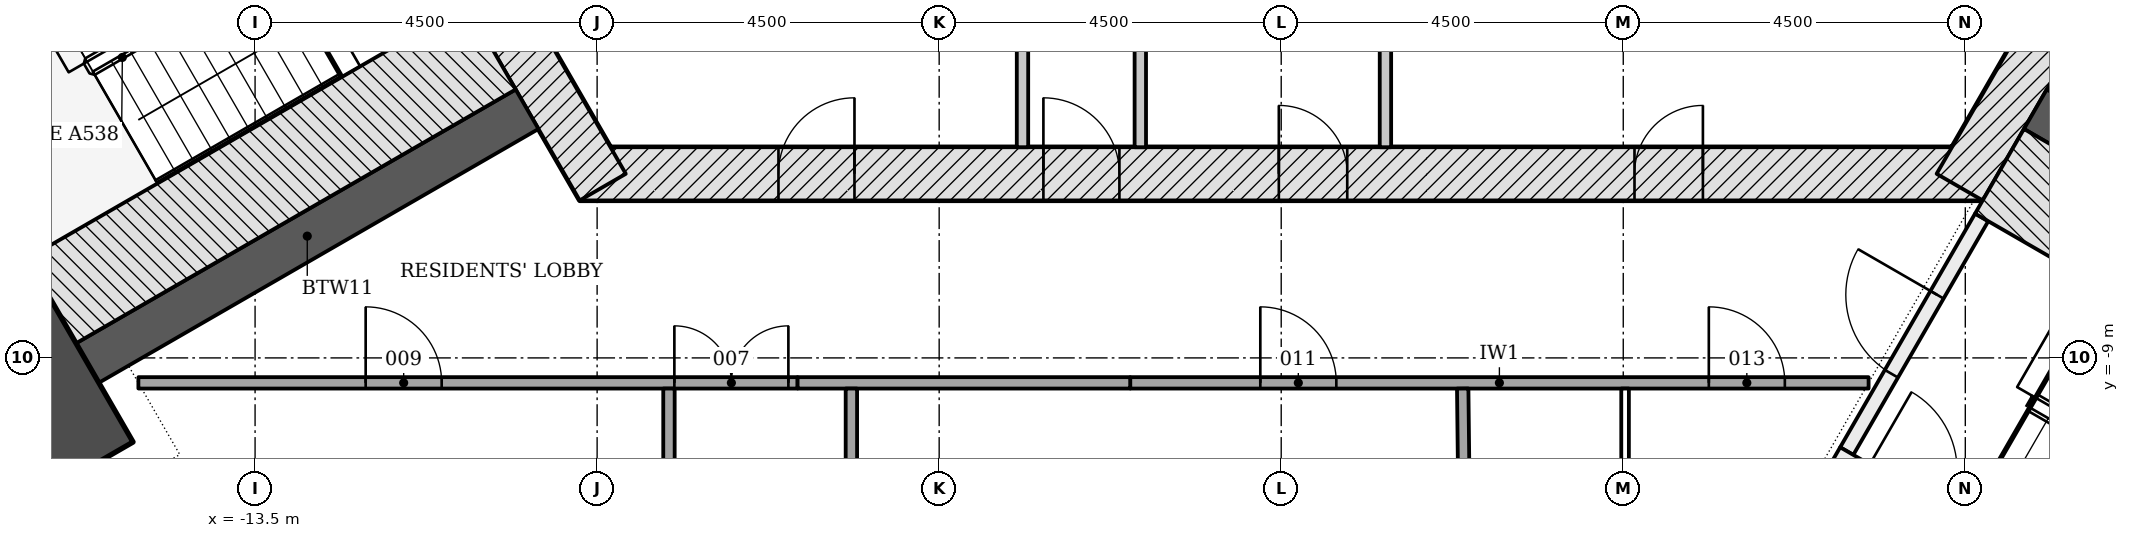
"""IFC4 building model, lengths in metres.
Left out: names, types, materials, properties, quantities, classifications, styles, units other than length and angle.
Written with IfcOpenShell. Run it as: python <this file> out.ifc"""

import sys

from ifc_helpers import new_model, si_unit, direction, frame, frame_2d, origin, origin_2d, place, context, subcontext, project, spatial, polyline, rectangle, outline, extrude, element, fill, save


model = new_model("IFC4")
c1 = context("Model", 3, precision=1e-05, world=origin(), true_north=direction((0.0, 1.0)))
c2 = subcontext(c1, "Body", "Model", "MODEL_VIEW")
j1 = project(units=[si_unit("LENGTHUNIT", "METRE"), si_unit("PLANEANGLEUNIT", "RADIAN")], contexts=[c1])
p1 = place(None, origin())
s1 = spatial("IfcSite", under=j1, at=p1, CompositionType="ELEMENT")
p2 = place(p1, origin())
s2 = spatial("IfcBuilding", under=s1, at=p2, CompositionType="ELEMENT")
p3 = place(p2, frame((0.0, 0.0, 263.4)))
s3 = spatial("IfcBuildingStorey", under=s2, at=p3, CompositionType="ELEMENT", Elevation=263.4)
p4 = place(p3, frame((-9.229, -6.578, -0.2), z_axis=(0.0, 0.0, 1.0), x_axis=(1.0, 0.0, 0.0)))
e1 = element("IfcWall", 1, at=p4, inside=s3, PredefinedType="SHEAR", context=c2, shape_type="SweptSolid", body=[
    extrude(rectangle(XDim=18.458, YDim=0.7, at=frame_2d((9.229, 0.0))), origin(), (0.0, 0.0, 1.0), 3.6),
])
p5 = place(p4, frame((6.1, 0.0, 0.2)))
e2 = element("IfcOpeningElement", 2, at=p5, cuts=e1, PredefinedType="OPENING", context=c2, shape_type="SweptSolid", body=[
    extrude(rectangle(XDim=1.0, YDim=2.1, at=frame_2d((0.5, 1.05))), frame((0.0, 0.36, 0.0), z_axis=(0.0, -1.0, 0.0), x_axis=(1.0, 0.0, 0.0)), (0.0, 0.0, 1.0), 0.72),
])
p6 = place(p4, frame((2.615, 0.0, 0.2)))
e3 = element("IfcOpeningElement", 3, at=p6, cuts=e1, PredefinedType="OPENING", context=c2, shape_type="SweptSolid", body=[
    extrude(rectangle(XDim=1.0, YDim=2.1, at=frame_2d((0.5, 1.05))), frame((0.0, 0.36, 0.0), z_axis=(0.0, -1.0, 0.0), x_axis=(1.0, 0.0, 0.0)), (0.0, 0.0, 1.0), 0.72),
])
p7 = place(p4, frame((9.198, 0.0, 0.2)))
e4 = element("IfcOpeningElement", 4, at=p7, cuts=e1, PredefinedType="OPENING", context=c2, shape_type="SweptSolid", body=[
    extrude(rectangle(XDim=0.9, YDim=2.1, at=frame_2d((0.45, 1.05))), frame((0.0, 0.36, 0.0), z_axis=(0.0, -1.0, 0.0), x_axis=(1.0, 0.0, 0.0)), (0.0, 0.0, 1.0), 0.72),
])
p8 = place(p4, frame((13.877, 0.0, 0.2)))
e5 = element("IfcOpeningElement", 5, at=p8, cuts=e1, PredefinedType="OPENING", context=c2, shape_type="SweptSolid", body=[
    extrude(rectangle(XDim=0.9, YDim=2.1, at=frame_2d((0.45, 1.05))), frame((0.0, 0.36, 0.0), z_axis=(0.0, -1.0, 0.0), x_axis=(1.0, 0.0, 0.0)), (0.0, 0.0, 1.0), 0.72),
])
for number, where, z_axis, x_axis in (
    (6, (8.926, -6.753, -0.2), (0.0, 0.0, 1.0), (0.5, 0.866, 0.0)),
    (7, (-10.311, -4.353, -0.2), (0.0, 0.0, 1.0), (0.5, -0.866, 0.0)),
):
    element("IfcWall", number, at=place(p3, frame(where, z_axis=z_axis, x_axis=x_axis)), inside=s3, PredefinedType="SHEAR", context=c2, shape_type="SweptSolid", body=[
        extrude(rectangle(XDim=2.771, YDim=0.7, at=frame_2d((1.386, 0.0))), origin(), (0.0, 0.0, 1.0), 3.6),
    ])
for number, where, z_axis, x_axis in (
    (8, (-9.922, -5.728, -0.2), (0.0, 0.0, 1.0), (-0.866, -0.5, 0.0)),
    (9, (9.922, -5.728, -0.2), (0.0, 0.0, 1.0), (0.866, -0.5, 0.0)),
):
    element("IfcWall", number, at=place(p3, frame(where, z_axis=z_axis, x_axis=x_axis)), inside=s3, PredefinedType="SHEAR", context=c2, shape_type="SweptSolid", body=[
        extrude(rectangle(XDim=6.678, YDim=0.6, at=frame_2d((3.339, 0.0))), origin(), (0.0, 0.0, 1.0), 3.6),
    ])
p9 = place(p3, frame((-16.745, -9.667, -0.2), z_axis=(0.0, 0.0, 1.0), x_axis=(-0.866025403784, -0.5, 0.0)))
e10 = element("IfcColumn", 10, at=p9, inside=s3, PredefinedType="COLUMN", context=c2, shape_type="SweptSolid", body=[
    extrude(rectangle(XDim=2.4, YDim=2.4, at=origin_2d()), origin(), (0.0, 0.0, 1.0), 3.6),
])
p10 = place(p3, origin())
e11 = element("IfcWall", 11, at=p10, inside=s3, PredefinedType="NOTDEFINED", context=c2, shape_type="SweptSolid", body=[
    extrude(outline(polyline([(-18.145, -2.507), (-19.021, -4.273), (-19.538, -5.703), (-19.733, -7.21), (-19.599, -8.724), (-19.141, -10.174), (-18.381, -11.49), (-17.355, -12.611), (-16.111, -13.485), (-14.708, -14.069), (-13.211, -14.336), (-11.244, -14.46), (-11.225, -14.161), (-13.176, -14.038), (-14.623, -13.779), (-15.965, -13.22), (-17.156, -12.385), (-18.138, -11.312), (-18.865, -10.052), (-19.303, -8.665), (-19.432, -7.216), (-19.244, -5.774), (-18.745, -4.391), (-17.876, -2.64), (-18.145, -2.507)])), origin(), (0.0, 0.0, 1.0), 3.3),
])
p11 = place(p3, frame((-3.404, 0.131, 0.0), z_axis=(0.0, 0.0, 1.0), x_axis=(0.0, -1.0, 0.0)))
e12 = element("IfcWall", 12, at=p11, inside=s3, PredefinedType="PARTITIONING", context=c2, shape_type="SweptSolid", body=[
    extrude(rectangle(XDim=6.359, YDim=0.15, at=frame_2d((3.18, 0.0))), origin(), (0.0, 0.0, 1.0), 3.4),
])
p12 = place(p11, frame((1.281, 0.0, 0.0)))
e13 = element("IfcOpeningElement", 13, at=p12, cuts=e12, PredefinedType="OPENING", context=c2, shape_type="SweptSolid", body=[
    extrude(rectangle(XDim=0.9, YDim=2.1, at=frame_2d((0.45, 1.05))), frame((0.0, 0.085, 0.0), z_axis=(0.0, -1.0, 0.0), x_axis=(1.0, 0.0, 0.0)), (0.0, 0.0, 1.0), 0.17),
])
p13 = place(p3, frame((-1.854, 5.497, 0.0), z_axis=(0.0, 0.0, 1.0), x_axis=(0.0, -1.0, 0.0)))
e14 = element("IfcWall", 14, at=p13, inside=s3, PredefinedType="PARTITIONING", context=c2, shape_type="SweptSolid", body=[
    extrude(rectangle(XDim=11.725, YDim=0.15, at=frame_2d((5.863, 0.0))), origin(), (0.0, 0.0, 1.0), 3.4),
])
p14 = place(p13, frame((5.775, 0.0, 0.0)))
e15 = element("IfcOpeningElement", 15, at=p14, cuts=e14, PredefinedType="OPENING", context=c2, shape_type="SweptSolid", body=[
    extrude(rectangle(XDim=0.9, YDim=2.1, at=frame_2d((0.45, 1.05))), frame((0.0, 0.085, 0.0), z_axis=(0.0, -1.0, 0.0), x_axis=(1.0, 0.0, 0.0)), (0.0, 0.0, 1.0), 0.17),
])
p15 = place(p13, frame((1.364, 0.0, 0.0)))
e16 = element("IfcOpeningElement", 16, at=p15, cuts=e14, PredefinedType="OPENING", context=c2, shape_type="SweptSolid", body=[
    extrude(rectangle(XDim=0.9, YDim=2.1, at=frame_2d((0.45, 1.05))), frame((0.0, 0.085, 0.0), z_axis=(0.0, -1.0, 0.0), x_axis=(1.0, 0.0, 0.0)), (0.0, 0.0, 1.0), 0.17),
])
p16 = place(p3, frame((1.371, -3.403, 0.0), z_axis=(0.0, 0.0, 1.0), x_axis=(0.0, -1.0, 0.0)))
e17 = element("IfcWall", 17, at=p16, inside=s3, PredefinedType="PARTITIONING", context=c2, shape_type="SweptSolid", body=[
    extrude(rectangle(XDim=2.825, YDim=0.15, at=frame_2d((1.413, 0.0))), origin(), (0.0, 0.0, 1.0), 3.4),
])
p17 = place(p3, frame((-10.393, -4.912, -0.2), z_axis=(0.0, 0.0, 1.0), x_axis=(-0.866025486527, -0.499999856685, 0.0)))
e18 = element("IfcWall", 18, at=p17, inside=s3, PredefinedType="SHEAR", context=c2, shape_type="SweptSolid", body=[
    extrude(rectangle(XDim=6.679, YDim=1.286, at=frame_2d((3.339, 0.0))), origin(), (0.0, 0.0, 1.0), 3.6),
])
p18 = place(p3, frame((7.44, -10.226, -0.2), z_axis=(0.0, 0.0, 1.0), x_axis=(0.500022077904, 0.866012656725, 0.0)))
e19 = element("IfcWall", 19, at=p18, inside=s3, PredefinedType="SHEAR", context=c2, shape_type="SweptSolid", body=[
    extrude(rectangle(XDim=3.55, YDim=0.2, at=frame_2d((1.775, 0.0))), origin(), (0.0, 0.0, 1.0), 3.6),
])
p19 = place(p18, frame((1.175, 0.0, 0.2)))
e20 = element("IfcOpeningElement", 20, at=p19, cuts=e19, PredefinedType="OPENING", context=c2, shape_type="SweptSolid", body=[
    extrude(rectangle(XDim=1.2, YDim=2.1, at=frame_2d((0.6, 1.05))), frame((0.0, 0.11, 0.0), z_axis=(0.0, -1.0, 0.0), x_axis=(1.0, 0.0, 0.0)), (0.0, 0.0, 1.0), 0.22),
])
p20 = place(p3, frame((7.304, -10.262, -0.2), z_axis=(0.0, 0.0, 1.0), x_axis=(0.866026594901, -0.49999793692, 0.0)))
e21 = element("IfcWall", 21, at=p20, inside=s3, PredefinedType="SHEAR", context=c2, shape_type="SweptSolid", body=[
    extrude(rectangle(XDim=5.6, YDim=0.2, at=frame_2d((2.8, 0.0))), origin(), (0.0, 0.0, 1.0), 3.6),
])
p21 = place(p20, frame((0.45, 0.0, 0.2)))
e22 = element("IfcOpeningElement", 22, at=p21, cuts=e21, PredefinedType="OPENING", context=c2, shape_type="SweptSolid", body=[
    extrude(rectangle(XDim=1.2, YDim=2.1, at=frame_2d((0.6, 1.05))), frame((0.0, 0.11, 0.0), z_axis=(0.0, -1.0, 0.0), x_axis=(1.0, 0.0, 0.0)), (0.0, 0.0, 1.0), 0.22),
])
p22 = place(p3, frame((9.45, -6.545, -0.2), z_axis=(0.0, 0.0, 1.0), x_axis=(0.866016347338, -0.500015685897, 0.0)))
e23 = element("IfcWall", 23, at=p22, inside=s3, PredefinedType="SHEAR", context=c2, shape_type="SweptSolid", body=[
    extrude(rectangle(XDim=6.678, YDim=1.286, at=frame_2d((3.339, 0.0))), origin(), (0.0, 0.0, 1.0), 3.6),
])
p23 = place(p3, frame((15.596, -8.357, 0.0), z_axis=(0.0, 0.0, 1.0), x_axis=(-0.500010741103, 0.866019202317, 0.0)))
e24 = element("IfcWall", 24, at=p23, inside=s3, PredefinedType="PARTITIONING", context=c2, shape_type="SweptSolid", body=[
    extrude(rectangle(XDim=13.049, YDim=0.15, at=frame_2d((6.524, 0.0))), origin(), (0.0, 0.0, 1.0), 2.852),
])
p24 = place(p3, frame((-15.035, -9.328, 0.0), z_axis=(0.0, 0.0, 1.0), x_axis=(1.0, 0.0, 0.0)))
e25 = element("IfcWall", 25, at=p24, inside=s3, PredefinedType="PARTITIONING", context=c2, shape_type="SweptSolid", body=[
    extrude(rectangle(XDim=8.673, YDim=0.15, at=frame_2d((4.336, 0.0))), origin(), (0.0, 0.0, 1.0), 2.852),
])
p25 = place(p24, frame((7.052, 0.0, 0.0)))
e26 = element("IfcOpeningElement", 26, at=p25, cuts=e25, PredefinedType="OPENING", context=c2, shape_type="SweptSolid", body=[
    extrude(rectangle(XDim=1.5, YDim=2.1, at=frame_2d((0.75, 1.05))), frame((0.0, 0.085, 0.0), z_axis=(0.0, -1.0, 0.0), x_axis=(1.0, 0.0, 0.0)), (0.0, 0.0, 1.0), 0.17),
])
p26 = place(p24, frame((2.99, 0.0, 0.0)))
e27 = element("IfcOpeningElement", 27, at=p26, cuts=e25, PredefinedType="OPENING", context=c2, shape_type="SweptSolid", body=[
    extrude(rectangle(XDim=1.0, YDim=2.1, at=frame_2d((0.5, 1.05))), frame((0.0, 0.085, 0.0), z_axis=(0.0, -1.0, 0.0), x_axis=(1.0, 0.0, 0.0)), (0.0, 0.0, 1.0), 0.17),
])
p27 = place(p3, frame((-1.987, -9.328, 0.0), z_axis=(0.0, 0.0, 1.0), x_axis=(1.0, 0.0, 0.0)))
e28 = element("IfcWall", 28, at=p27, inside=s3, PredefinedType="PARTITIONING", context=c2, shape_type="SweptSolid", body=[
    extrude(rectangle(XDim=9.714, YDim=0.15, at=frame_2d((4.857, 0.0))), origin(), (0.0, 0.0, 1.0), 2.852),
])
p28 = place(p27, frame((1.712, 0.0, 0.0)))
e29 = element("IfcOpeningElement", 29, at=p28, cuts=e28, PredefinedType="OPENING", context=c2, shape_type="SweptSolid", body=[
    extrude(rectangle(XDim=1.0, YDim=2.1, at=frame_2d((0.5, 1.05))), frame((0.0, 0.085, 0.0), z_axis=(0.0, -1.0, 0.0), x_axis=(1.0, 0.0, 0.0)), (0.0, 0.0, 1.0), 0.17),
])
p29 = place(p27, frame((7.613, 0.0, 0.0)))
e30 = element("IfcOpeningElement", 30, at=p29, cuts=e28, PredefinedType="OPENING", context=c2, shape_type="SweptSolid", body=[
    extrude(rectangle(XDim=1.0, YDim=2.1, at=frame_2d((0.5, 1.05))), frame((0.0, 0.085, 0.0), z_axis=(0.0, -1.0, 0.0), x_axis=(1.0, 0.0, 0.0)), (0.0, 0.0, 1.0), 0.17),
])
p30 = place(p3, frame((-6.363, -9.328, 0.0), z_axis=(0.0, 0.0, 1.0), x_axis=(1.0, 0.0, 0.0)))
e31 = element("IfcWall", 31, at=p30, inside=s3, PredefinedType="PARTITIONING", context=c2, shape_type="SweptSolid", body=[
    extrude(rectangle(XDim=4.376, YDim=0.15, at=frame_2d((2.188, 0.0))), origin(), (0.0, 0.0, 1.0), 2.852),
])
p31 = place(p3, frame((2.442, -14.069, 0.0), z_axis=(0.0, 0.0, 1.0), x_axis=(-0.011616170678, 0.999932530013, 0.0)))
e32 = element("IfcWall", 32, at=p31, inside=s3, PredefinedType="PARTITIONING", context=c2, shape_type="SweptSolid", body=[
    extrude(rectangle(XDim=4.666, YDim=0.15, at=frame_2d((2.333, 0.0))), origin(), (0.0, 0.0, 1.0), 3.4),
])
for number, where, z_axis, x_axis in (
    (33, (-8.055, -9.403, 0.0), (0.0, 0.0, 1.0), (0.0, -1.0, 0.0)),
    (34, (-5.655, -9.403, 0.0), (0.0, 0.0, 1.0), (0.0, -1.0, 0.0)),
):
    element("IfcWall", number, at=place(p3, frame(where, z_axis=z_axis, x_axis=x_axis)), inside=s3, PredefinedType="PARTITIONING", context=c2, shape_type="SweptSolid", body=[
        extrude(rectangle(XDim=2.569, YDim=0.15, at=frame_2d((1.284, 0.0))), origin(), (0.0, 0.0, 1.0), 3.4),
    ])
p32 = place(p3, frame((4.524, -12.478, 0.0), z_axis=(0.0, 0.0, 1.0), x_axis=(0.0, 1.0, 0.0)))
e35 = element("IfcWall", 35, at=p32, inside=s3, PredefinedType="PARTITIONING", context=c2, shape_type="SweptSolid", body=[
    extrude(rectangle(XDim=3.075, YDim=0.1, at=frame_2d((1.538, 0.0))), origin(), (0.0, 0.0, 1.0), 3.4),
])
p33 = place(p32, frame((1.05, 0.0, 0.0)))
e36 = element("IfcOpeningElement", 36, at=p33, cuts=e35, PredefinedType="OPENING", context=c2, shape_type="SweptSolid", body=[
    extrude(rectangle(XDim=1.0, YDim=2.1, at=frame_2d((0.5, 1.05))), frame((0.0, 0.06, 0.0), z_axis=(0.0, -1.0, 0.0), x_axis=(1.0, 0.0, 0.0)), (0.0, 0.0, 1.0), 0.12),
])
p34 = place(p5, origin())
e37 = element("IfcDoor", 37, at=p34, inside=s3, OperationType="SINGLE_SWING_LEFT", PredefinedType="DOOR", context=c2, shape_type="SweptSolid", body=[
    extrude(rectangle(XDim=1.0, YDim=2.1, at=frame_2d((0.5, 1.05))), frame((0.0, 0.075, 0.0), z_axis=(0.0, -1.0, 0.0), x_axis=(1.0, 0.0, 0.0)), (0.0, 0.0, 1.0), 0.15),
])
fill(e2, e37)
p35 = place(p6, origin())
e38 = element("IfcDoor", 38, at=p35, inside=s3, OperationType="SINGLE_SWING_RIGHT", PredefinedType="DOOR", context=c2, shape_type="SweptSolid", body=[
    extrude(rectangle(XDim=1.0, YDim=2.1, at=frame_2d((0.5, 1.05))), frame((0.0, 0.075, 0.0), z_axis=(0.0, -1.0, 0.0), x_axis=(1.0, 0.0, 0.0)), (0.0, 0.0, 1.0), 0.15),
])
fill(e3, e38)
p36 = place(p7, origin())
e39 = element("IfcDoor", 39, at=p36, inside=s3, OperationType="SINGLE_SWING_LEFT", PredefinedType="DOOR", context=c2, shape_type="SweptSolid", body=[
    extrude(rectangle(XDim=0.9, YDim=2.1, at=frame_2d((0.45, 1.05))), frame((0.0, 0.075, 0.0), z_axis=(0.0, -1.0, 0.0), x_axis=(1.0, 0.0, 0.0)), (0.0, 0.0, 1.0), 0.15),
])
fill(e4, e39)
p37 = place(p8, origin())
e40 = element("IfcDoor", 40, at=p37, inside=s3, OperationType="SINGLE_SWING_RIGHT", PredefinedType="DOOR", context=c2, shape_type="SweptSolid", body=[
    extrude(rectangle(XDim=0.9, YDim=2.1, at=frame_2d((0.45, 1.05))), frame((0.0, 0.075, 0.0), z_axis=(0.0, -1.0, 0.0), x_axis=(1.0, 0.0, 0.0)), (0.0, 0.0, 1.0), 0.15),
])
fill(e5, e40)
p38 = place(p19, origin())
e41 = element("IfcDoor", 41, at=p38, inside=s3, OperationType="SINGLE_SWING_RIGHT", PredefinedType="DOOR", context=c2, shape_type="SweptSolid", body=[
    extrude(rectangle(XDim=1.2, YDim=2.1, at=frame_2d((0.6, 1.05))), frame((0.0, 0.025, 0.0), z_axis=(0.0, -1.0, 0.0), x_axis=(1.0, 0.0, 0.0)), (0.0, 0.0, 1.0), 0.05),
])
fill(e20, e41)
p39 = place(p25, origin())
e42 = element("IfcDoor", 42, at=p39, inside=s3, OperationType="DOUBLE_DOOR_SINGLE_SWING", PredefinedType="DOOR", context=c2, shape_type="SweptSolid", body=[
    extrude(rectangle(XDim=1.5, YDim=2.1, at=frame_2d((0.75, 1.05))), frame((0.0, 0.025, 0.0), z_axis=(0.0, -1.0, 0.0), x_axis=(1.0, 0.0, 0.0)), (0.0, 0.0, 1.0), 0.05),
])
fill(e26, e42)
p40 = place(p26, origin())
e43 = element("IfcDoor", 43, at=p40, inside=s3, OperationType="SINGLE_SWING_LEFT", PredefinedType="DOOR", context=c2, shape_type="SweptSolid", body=[
    extrude(rectangle(XDim=1.0, YDim=2.1, at=frame_2d((0.5, 1.05))), frame((0.0, 0.025, 0.0), z_axis=(0.0, -1.0, 0.0), x_axis=(1.0, 0.0, 0.0)), (0.0, 0.0, 1.0), 0.05),
])
fill(e27, e43)
p41 = place(p28, origin())
e44 = element("IfcDoor", 44, at=p41, inside=s3, OperationType="SINGLE_SWING_LEFT", PredefinedType="DOOR", context=c2, shape_type="SweptSolid", body=[
    extrude(rectangle(XDim=1.0, YDim=2.1, at=frame_2d((0.5, 1.05))), frame((0.0, 0.025, 0.0), z_axis=(0.0, -1.0, 0.0), x_axis=(1.0, 0.0, 0.0)), (0.0, 0.0, 1.0), 0.05),
])
fill(e29, e44)
p42 = place(p29, origin())
e45 = element("IfcDoor", 45, at=p42, inside=s3, OperationType="SINGLE_SWING_LEFT", PredefinedType="DOOR", context=c2, shape_type="SweptSolid", body=[
    extrude(rectangle(XDim=1.0, YDim=2.1, at=frame_2d((0.5, 1.05))), frame((0.0, 0.025, 0.0), z_axis=(0.0, -1.0, 0.0), x_axis=(1.0, 0.0, 0.0)), (0.0, 0.0, 1.0), 0.05),
])
fill(e30, e45)
save(model, sys.argv[1])
